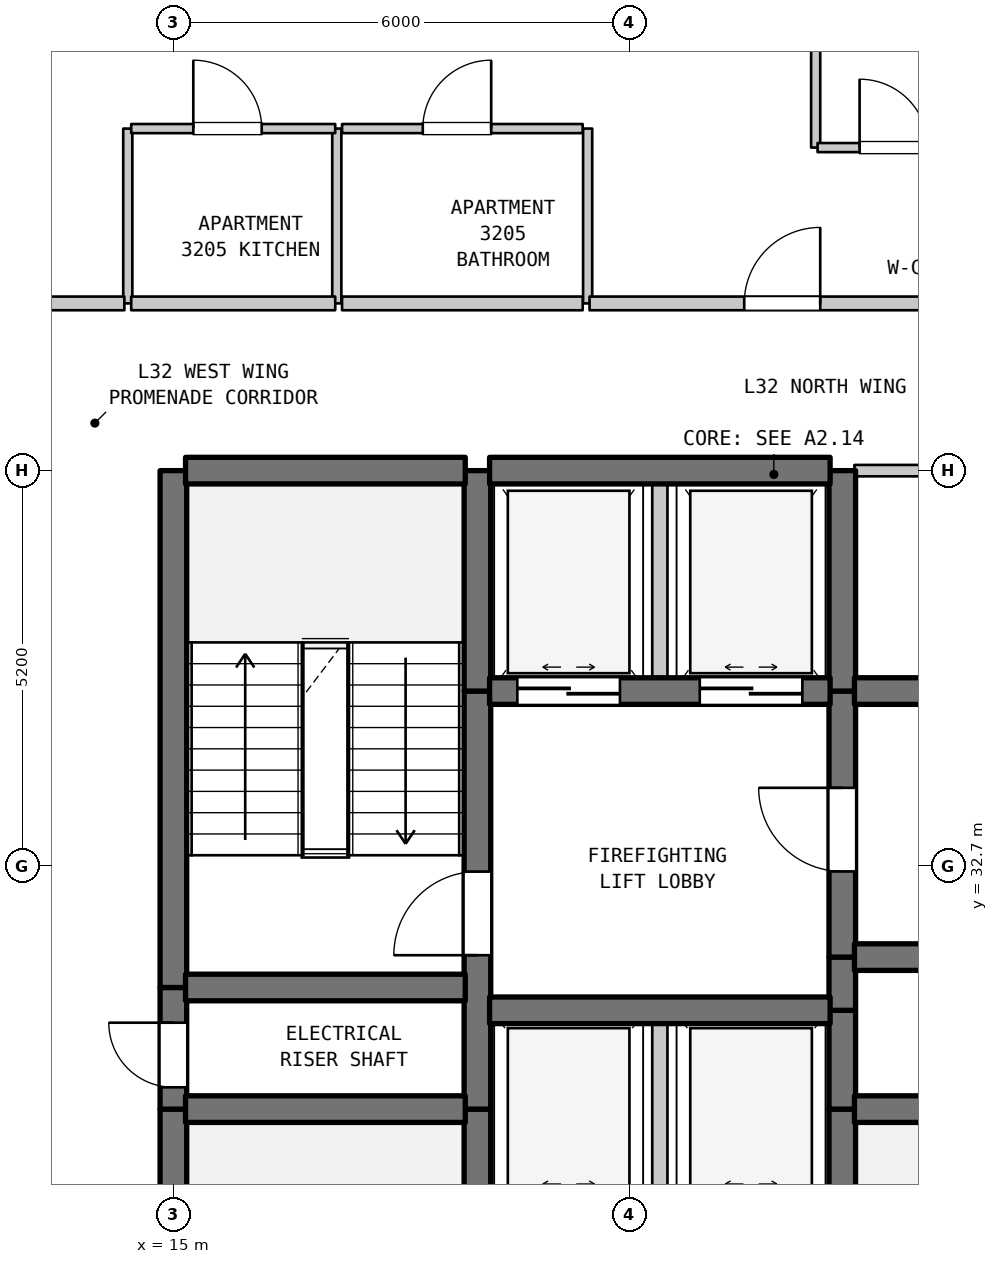
"""IFC4 building model, lengths in metres.
Left out: names, types, materials, properties, quantities, classifications, styles, units other than length and angle.
Written with IfcOpenShell. Run it as: python <this file> out.ifc"""

import sys

from ifc_helpers import new_model, si_unit, direction, frame, frame_2d, origin, place, context, subcontext, project, spatial, rectangle, extrude, element, fill, save


model = new_model("IFC4")
c1 = context("Model", 3, precision=1e-05, world=origin(), true_north=direction((0.0, 1.0)))
c2 = subcontext(c1, "Body", "Model", "MODEL_VIEW")
j1 = project(units=[si_unit("LENGTHUNIT", "METRE"), si_unit("PLANEANGLEUNIT", "RADIAN")], contexts=[c1])
p1 = place(None, origin())
s1 = spatial("IfcSite", under=j1, at=p1, CompositionType="ELEMENT")
p2 = place(p1, origin())
s2 = spatial("IfcBuilding", under=s1, at=p2, CompositionType="ELEMENT")
p3 = place(p2, frame((0.0, 0.0, 133.5)))
s3 = spatial("IfcBuildingStorey", under=s2, at=p3, CompositionType="ELEMENT", Elevation=133.5)
p4 = place(p3, frame((14.4, 40.1, 0.0), z_axis=(0.0, 0.0, 1.0), x_axis=(0.0, 1.0, 0.0)))
e1 = element("IfcWall", 1, at=p4, inside=s3, PredefinedType="PARTITIONING", context=c2, shape_type="SweptSolid", body=[
    extrude(rectangle(XDim=2.3, YDim=0.12, at=frame_2d((1.15, 0.0))), origin(), (0.0, 0.0, 1.0), 3.385),
])
p5 = place(p3, frame((15.0, 22.7, 0.0), z_axis=(0.0, 0.0, 1.0), x_axis=(0.0, 1.0, 0.0)))
e2 = element("IfcWall", 2, at=p5, inside=s3, PredefinedType="SHEAR", context=c2, shape_type="SweptSolid", body=[
    extrude(rectangle(XDim=6.8, YDim=0.35, at=frame_2d((3.4, 0.0))), origin(), (0.0, 0.0, 1.0), 3.385),
])
p6 = place(p3, frame((15.0, 29.5, 0.0), z_axis=(0.0, 0.0, 1.0), x_axis=(0.0, 1.0, 0.0)))
e3 = element("IfcWall", 3, at=p6, inside=s3, PredefinedType="SHEAR", context=c2, shape_type="SweptSolid", body=[
    extrude(rectangle(XDim=1.6, YDim=0.35, at=frame_2d((0.8, 0.0))), origin(), (0.0, 0.0, 1.0), 3.385),
])
p7 = place(p6, frame((0.287, 0.0, 0.0)))
e4 = element("IfcOpeningElement", 4, at=p7, cuts=e3, PredefinedType="OPENING", context=c2, shape_type="SweptSolid", body=[
    extrude(rectangle(XDim=0.85, YDim=2.1, at=frame_2d((0.425, 1.05))), frame((0.0, 0.185, 0.0), z_axis=(0.0, -1.0, 0.0), x_axis=(1.0, 0.0, 0.0)), (0.0, 0.0, 1.0), 0.37),
])
p8 = place(p3, frame((15.0, 31.1, 0.0), z_axis=(0.0, 0.0, 1.0), x_axis=(0.0, 1.0, 0.0)))
e5 = element("IfcWall", 5, at=p8, inside=s3, PredefinedType="SHEAR", context=c2, shape_type="SweptSolid", body=[
    extrude(rectangle(XDim=6.8, YDim=0.35, at=frame_2d((3.4, 0.0))), origin(), (0.0, 0.0, 1.0), 3.385),
])
p9 = place(p3, frame((17.15, 40.1, 0.0), z_axis=(0.0, 0.0, 1.0), x_axis=(0.0, 1.0, 0.0)))
e6 = element("IfcWall", 6, at=p9, inside=s3, PredefinedType="PARTITIONING", context=c2, shape_type="SweptSolid", body=[
    extrude(rectangle(XDim=2.3, YDim=0.12, at=frame_2d((1.15, 0.0))), origin(), (0.0, 0.0, 1.0), 3.385),
])
p10 = place(p3, frame((19.0, 28.2, 0.0), z_axis=(0.0, 0.0, 1.0), x_axis=(0.0, 1.0, 0.0)))
e7 = element("IfcWall", 7, at=p10, inside=s3, PredefinedType="SHEAR", context=c2, shape_type="SweptSolid", body=[
    extrude(rectangle(XDim=1.3, YDim=0.35, at=frame_2d((0.65, 0.0))), origin(), (0.0, 0.0, 1.0), 3.385),
])
p11 = place(p3, frame((19.0, 29.5, 0.0), z_axis=(0.0, 0.0, 1.0), x_axis=(0.0, 1.0, 0.0)))
e8 = element("IfcWall", 8, at=p11, inside=s3, PredefinedType="SHEAR", context=c2, shape_type="SweptSolid", body=[
    extrude(rectangle(XDim=5.5, YDim=0.35, at=frame_2d((2.75, 0.0))), origin(), (0.0, 0.0, 1.0), 3.385),
])
p12 = place(p11, frame((2.025, 0.0, 0.0)))
e9 = element("IfcOpeningElement", 9, at=p12, cuts=e8, PredefinedType="OPENING", context=c2, shape_type="SweptSolid", body=[
    extrude(rectangle(XDim=1.1, YDim=2.15, at=frame_2d((0.55, 1.075))), frame((0.0, 0.185, 0.0), z_axis=(0.0, -1.0, 0.0), x_axis=(1.0, 0.0, 0.0)), (0.0, 0.0, 1.0), 0.37),
])
p13 = place(p3, frame((19.0, 35.0, 0.0), z_axis=(0.0, 0.0, 1.0), x_axis=(0.0, 1.0, 0.0)))
e10 = element("IfcWall", 10, at=p13, inside=s3, PredefinedType="SHEAR", context=c2, shape_type="SweptSolid", body=[
    extrude(rectangle(XDim=2.9, YDim=0.35, at=frame_2d((1.45, 0.0))), origin(), (0.0, 0.0, 1.0), 3.385),
])
p14 = place(p3, frame((20.45, 40.1, 0.0), z_axis=(0.0, 0.0, 1.0), x_axis=(0.0, 1.0, 0.0)))
e11 = element("IfcWall", 11, at=p14, inside=s3, PredefinedType="PARTITIONING", context=c2, shape_type="SweptSolid", body=[
    extrude(rectangle(XDim=2.3, YDim=0.12, at=frame_2d((1.15, 0.0))), origin(), (0.0, 0.0, 1.0), 3.385),
])
p15 = place(p3, frame((21.4, 28.2, 0.0), z_axis=(0.0, 0.0, 1.0), x_axis=(0.0, 1.0, 0.0)))
e12 = element("IfcWall", 12, at=p15, inside=s3, PredefinedType="STANDARD", context=c2, shape_type="SweptSolid", body=[
    extrude(rectangle(XDim=2.6, YDim=0.2, at=frame_2d((1.3, 0.0))), origin(), (0.0, 0.0, 1.0), 3.385),
])
p16 = place(p3, frame((21.4, 35.0, 0.0), z_axis=(0.0, 0.0, 1.0), x_axis=(0.0, 1.0, 0.0)))
e13 = element("IfcWall", 13, at=p16, inside=s3, PredefinedType="STANDARD", context=c2, shape_type="SweptSolid", body=[
    extrude(rectangle(XDim=2.9, YDim=0.2, at=frame_2d((1.45, 0.0))), origin(), (0.0, 0.0, 1.0), 3.385),
])
p17 = place(p3, frame((23.45, 42.15, 0.0), z_axis=(0.0, 0.0, 1.0), x_axis=(0.0, 1.0, 0.0)))
e14 = element("IfcWall", 14, at=p17, inside=s3, PredefinedType="PARTITIONING", context=c2, shape_type="SweptSolid", body=[
    extrude(rectangle(XDim=11.74, YDim=0.12, at=frame_2d((5.87, 0.0))), origin(), (0.0, 0.0, 1.0), 3.385),
])
for number, where, z_axis, x_axis in (
    (15, (23.8, 28.2, 0.0), (0.0, 0.0, 1.0), (0.0, 1.0, 0.0)),
    (16, (23.8, 29.5, 0.0), (0.0, 0.0, 1.0), (0.0, 1.0, 0.0)),
):
    element("IfcWall", number, at=place(p3, frame(where, z_axis=z_axis, x_axis=x_axis)), inside=s3, PredefinedType="SHEAR", context=c2, shape_type="SweptSolid", body=[
        extrude(rectangle(XDim=1.3, YDim=0.35, at=frame_2d((0.65, 0.0))), origin(), (0.0, 0.0, 1.0), 3.385),
    ])
p18 = place(p3, frame((23.8, 30.8, 0.0), z_axis=(0.0, 0.0, 1.0), x_axis=(0.0, 1.0, 0.0)))
e17 = element("IfcWall", 17, at=p18, inside=s3, PredefinedType="SHEAR", context=c2, shape_type="SweptSolid", body=[
    extrude(rectangle(XDim=0.7, YDim=0.35, at=frame_2d((0.35, 0.0))), origin(), (0.0, 0.0, 1.0), 3.385),
])
p19 = place(p3, frame((23.8, 31.5, 0.0), z_axis=(0.0, 0.0, 1.0), x_axis=(0.0, 1.0, 0.0)))
e18 = element("IfcWall", 18, at=p19, inside=s3, PredefinedType="SHEAR", context=c2, shape_type="SweptSolid", body=[
    extrude(rectangle(XDim=3.5, YDim=0.35, at=frame_2d((1.75, 0.0))), origin(), (0.0, 0.0, 1.0), 3.385),
])
p20 = place(p19, frame((1.127, 0.0, 0.0)))
e19 = element("IfcOpeningElement", 19, at=p20, cuts=e18, PredefinedType="OPENING", context=c2, shape_type="SweptSolid", body=[
    extrude(rectangle(XDim=1.1, YDim=2.15, at=frame_2d((0.55, 1.075))), frame((0.0, 0.185, 0.0), z_axis=(0.0, -1.0, 0.0), x_axis=(1.0, 0.0, 0.0)), (0.0, 0.0, 1.0), 0.37),
])
p21 = place(p3, frame((23.8, 35.0, 0.0), z_axis=(0.0, 0.0, 1.0), x_axis=(0.0, 1.0, 0.0)))
e20 = element("IfcWall", 20, at=p21, inside=s3, PredefinedType="SHEAR", context=c2, shape_type="SweptSolid", body=[
    extrude(rectangle(XDim=2.9, YDim=0.35, at=frame_2d((1.45, 0.0))), origin(), (0.0, 0.0, 1.0), 3.385),
])
p22 = place(p3, frame((15.16, 29.5, 0.0), z_axis=(0.0, 0.0, 1.0), x_axis=(1.0, 0.0, 0.0)))
e21 = element("IfcWall", 21, at=p22, inside=s3, PredefinedType="SHEAR", context=c2, shape_type="SweptSolid", body=[
    extrude(rectangle(XDim=3.68, YDim=0.35, at=frame_2d((1.84, 0.0))), origin(), (0.0, 0.0, 1.0), 3.385),
])
p23 = place(p3, frame((23.96, 29.5, 0.0), z_axis=(0.0, 0.0, 1.0), x_axis=(1.0, 0.0, 0.0)))
e22 = element("IfcWall", 22, at=p23, inside=s3, PredefinedType="SHEAR", context=c2, shape_type="SweptSolid", body=[
    extrude(rectangle(XDim=3.18, YDim=0.35, at=frame_2d((1.59, 0.0))), origin(), (0.0, 0.0, 1.0), 3.385),
])
p24 = place(p3, frame((19.16, 30.8, 0.0), z_axis=(0.0, 0.0, 1.0), x_axis=(1.0, 0.0, 0.0)))
e23 = element("IfcWall", 23, at=p24, inside=s3, PredefinedType="SHEAR", context=c2, shape_type="SweptSolid", body=[
    extrude(rectangle(XDim=4.48, YDim=0.35, at=frame_2d((2.24, 0.0))), origin(), (0.0, 0.0, 1.0), 3.385),
])
p25 = place(p3, frame((15.16, 31.1, 0.0), z_axis=(0.0, 0.0, 1.0), x_axis=(1.0, 0.0, 0.0)))
e24 = element("IfcWall", 24, at=p25, inside=s3, PredefinedType="SHEAR", context=c2, shape_type="SweptSolid", body=[
    extrude(rectangle(XDim=3.68, YDim=0.35, at=frame_2d((1.84, 0.0))), origin(), (0.0, 0.0, 1.0), 3.385),
])
p26 = place(p3, frame((23.96, 31.5, 0.0), z_axis=(0.0, 0.0, 1.0), x_axis=(1.0, 0.0, 0.0)))
e25 = element("IfcWall", 25, at=p26, inside=s3, PredefinedType="SHEAR", context=c2, shape_type="SweptSolid", body=[
    extrude(rectangle(XDim=3.18, YDim=0.35, at=frame_2d((1.59, 0.0))), origin(), (0.0, 0.0, 1.0), 3.385),
])
p27 = place(p26, frame((1.094, 0.0, 0.0)))
e26 = element("IfcOpeningElement", 26, at=p27, cuts=e25, PredefinedType="OPENING", context=c2, shape_type="SweptSolid", body=[
    extrude(rectangle(XDim=0.85, YDim=2.1, at=frame_2d((0.425, 1.05))), frame((0.0, 0.185, 0.0), z_axis=(0.0, -1.0, 0.0), x_axis=(1.0, 0.0, 0.0)), (0.0, 0.0, 1.0), 0.37),
])
p28 = place(p3, frame((19.16, 35.0, 0.0), z_axis=(0.0, 0.0, 1.0), x_axis=(1.0, 0.0, 0.0)))
e27 = element("IfcWall", 27, at=p28, inside=s3, PredefinedType="SHEAR", context=c2, shape_type="SweptSolid", body=[
    extrude(rectangle(XDim=4.48, YDim=0.35, at=frame_2d((2.24, 0.0))), origin(), (0.0, 0.0, 1.0), 3.385),
])
p29 = place(p28, frame((0.365, 0.0, 0.0)))
e28 = element("IfcOpeningElement", 28, at=p29, cuts=e27, PredefinedType="OPENING", context=c2, shape_type="SweptSolid", body=[
    extrude(rectangle(XDim=1.35, YDim=2.2, at=frame_2d((0.675, 1.1))), frame((0.0, 0.185, 0.0), z_axis=(0.0, -1.0, 0.0), x_axis=(1.0, 0.0, 0.0)), (0.0, 0.0, 1.0), 0.37),
])
p30 = place(p28, frame((2.765, 0.0, 0.0)))
e29 = element("IfcOpeningElement", 29, at=p30, cuts=e27, PredefinedType="OPENING", context=c2, shape_type="SweptSolid", body=[
    extrude(rectangle(XDim=1.35, YDim=2.2, at=frame_2d((0.675, 1.1))), frame((0.0, 0.185, 0.0), z_axis=(0.0, -1.0, 0.0), x_axis=(1.0, 0.0, 0.0)), (0.0, 0.0, 1.0), 0.37),
])
p31 = place(p3, frame((23.96, 35.0, 0.0), z_axis=(0.0, 0.0, 1.0), x_axis=(1.0, 0.0, 0.0)))
e30 = element("IfcWall", 30, at=p31, inside=s3, PredefinedType="SHEAR", context=c2, shape_type="SweptSolid", body=[
    extrude(rectangle(XDim=3.995, YDim=0.35, at=frame_2d((1.998, 0.0))), origin(), (0.0, 0.0, 1.0), 3.385),
])
p32 = place(p31, frame((1.393, 0.0, 0.0)))
e31 = element("IfcOpeningElement", 31, at=p32, cuts=e30, PredefinedType="OPENING", context=c2, shape_type="SweptSolid", body=[
    extrude(rectangle(XDim=0.95, YDim=2.15, at=frame_2d((0.475, 1.075))), frame((0.0, 0.185, 0.0), z_axis=(0.0, -1.0, 0.0), x_axis=(1.0, 0.0, 0.0)), (0.0, 0.0, 1.0), 0.37),
])
p33 = place(p3, frame((15.16, 37.9, 0.0), z_axis=(0.0, 0.0, 1.0), x_axis=(1.0, 0.0, 0.0)))
e32 = element("IfcWall", 32, at=p33, inside=s3, PredefinedType="SHEAR", context=c2, shape_type="SweptSolid", body=[
    extrude(rectangle(XDim=3.68, YDim=0.35, at=frame_2d((1.84, 0.0))), origin(), (0.0, 0.0, 1.0), 3.385),
])
p34 = place(p3, frame((19.16, 37.9, 0.0), z_axis=(0.0, 0.0, 1.0), x_axis=(1.0, 0.0, 0.0)))
e33 = element("IfcWall", 33, at=p34, inside=s3, PredefinedType="SHEAR", context=c2, shape_type="SweptSolid", body=[
    extrude(rectangle(XDim=4.48, YDim=0.35, at=frame_2d((2.24, 0.0))), origin(), (0.0, 0.0, 1.0), 3.385),
])
p35 = place(p3, frame((23.96, 37.9, 0.0), z_axis=(0.0, 0.0, 1.0), x_axis=(1.0, 0.0, 0.0)))
e34 = element("IfcWall", 34, at=p35, inside=s3, PredefinedType="STANDARD", context=c2, shape_type="SweptSolid", body=[
    extrude(rectangle(XDim=3.995, YDim=0.15, at=frame_2d((1.998, 0.0))), origin(), (0.0, 0.0, 1.0), 2.885),
])
p36 = place(p3, frame((12.875, 40.1, 0.0), z_axis=(0.0, 0.0, 1.0), x_axis=(1.0, 0.0, 0.0)))
e35 = element("IfcWall", 35, at=p36, inside=s3, PredefinedType="STANDARD", context=c2, shape_type="SweptSolid", body=[
    extrude(rectangle(XDim=1.48, YDim=0.18, at=frame_2d((0.74, 0.0))), origin(), (0.0, 0.0, 1.0), 3.385),
])
p37 = place(p3, frame((14.445, 40.1, 0.0), z_axis=(0.0, 0.0, 1.0), x_axis=(1.0, 0.0, 0.0)))
e36 = element("IfcWall", 36, at=p37, inside=s3, PredefinedType="STANDARD", context=c2, shape_type="SweptSolid", body=[
    extrude(rectangle(XDim=2.684, YDim=0.18, at=frame_2d((1.342, 0.0))), origin(), (0.0, 0.0, 1.0), 3.385),
])
p38 = place(p3, frame((17.219, 40.1, 0.0), z_axis=(0.0, 0.0, 1.0), x_axis=(1.0, 0.0, 0.0)))
e37 = element("IfcWall", 37, at=p38, inside=s3, PredefinedType="STANDARD", context=c2, shape_type="SweptSolid", body=[
    extrude(rectangle(XDim=3.166, YDim=0.18, at=frame_2d((1.583, 0.0))), origin(), (0.0, 0.0, 1.0), 3.385),
])
p39 = place(p3, frame((20.475, 40.1, 0.0), z_axis=(0.0, 0.0, 1.0), x_axis=(1.0, 0.0, 0.0)))
e38 = element("IfcWall", 38, at=p39, inside=s3, PredefinedType="STANDARD", context=c2, shape_type="SweptSolid", body=[
    extrude(rectangle(XDim=8.76, YDim=0.18, at=frame_2d((4.38, 0.0))), origin(), (0.0, 0.0, 1.0), 3.385),
])
p40 = place(p39, frame((2.035, 0.0, 0.0)))
e39 = element("IfcOpeningElement", 39, at=p40, cuts=e38, PredefinedType="OPENING", context=c2, shape_type="SweptSolid", body=[
    extrude(rectangle(XDim=1.0, YDim=2.15, at=frame_2d((0.5, 1.075))), frame((0.0, 0.1, 0.0), z_axis=(0.0, -1.0, 0.0), x_axis=(1.0, 0.0, 0.0)), (0.0, 0.0, 1.0), 0.2),
])
p41 = place(p39, frame((6.409, 0.0, 0.0)))
e40 = element("IfcOpeningElement", 40, at=p41, cuts=e38, PredefinedType="OPENING", context=c2, shape_type="SweptSolid", body=[
    extrude(rectangle(XDim=1.0, YDim=2.15, at=frame_2d((0.5, 1.075))), frame((0.0, 0.1, 0.0), z_axis=(0.0, -1.0, 0.0), x_axis=(1.0, 0.0, 0.0)), (0.0, 0.0, 1.0), 0.2),
])
p42 = place(p3, frame((23.475, 42.15, 0.0), z_axis=(0.0, 0.0, 1.0), x_axis=(1.0, 0.0, 0.0)))
e41 = element("IfcWall", 41, at=p42, inside=s3, PredefinedType="PARTITIONING", context=c2, shape_type="SweptSolid", body=[
    extrude(rectangle(XDim=2.16, YDim=0.12, at=frame_2d((1.08, 0.0))), origin(), (0.0, 0.0, 1.0), 3.385),
])
p43 = place(p42, frame((0.553, 0.0, 0.0)))
e42 = element("IfcOpeningElement", 42, at=p43, cuts=e41, PredefinedType="OPENING", context=c2, shape_type="SweptSolid", body=[
    extrude(rectangle(XDim=0.9, YDim=2.15, at=frame_2d((0.45, 1.075))), frame((0.0, 0.07, 0.0), z_axis=(0.0, -1.0, 0.0), x_axis=(1.0, 0.0, 0.0)), (0.0, 0.0, 1.0), 0.14),
])
p44 = place(p3, frame((14.445, 42.4, 0.0), z_axis=(0.0, 0.0, 1.0), x_axis=(1.0, 0.0, 0.0)))
e43 = element("IfcWall", 43, at=p44, inside=s3, PredefinedType="PARTITIONING", context=c2, shape_type="SweptSolid", body=[
    extrude(rectangle(XDim=2.684, YDim=0.12, at=frame_2d((1.342, 0.0))), origin(), (0.0, 0.0, 1.0), 3.385),
])
p45 = place(p44, frame((0.817, 0.0, 0.0)))
e44 = element("IfcOpeningElement", 44, at=p45, cuts=e43, PredefinedType="OPENING", context=c2, shape_type="SweptSolid", body=[
    extrude(rectangle(XDim=0.9, YDim=2.15, at=frame_2d((0.45, 1.075))), frame((0.0, 0.07, 0.0), z_axis=(0.0, -1.0, 0.0), x_axis=(1.0, 0.0, 0.0)), (0.0, 0.0, 1.0), 0.14),
])
p46 = place(p3, frame((17.219, 42.4, 0.0), z_axis=(0.0, 0.0, 1.0), x_axis=(1.0, 0.0, 0.0)))
e45 = element("IfcWall", 45, at=p46, inside=s3, PredefinedType="PARTITIONING", context=c2, shape_type="SweptSolid", body=[
    extrude(rectangle(XDim=3.166, YDim=0.12, at=frame_2d((1.583, 0.0))), origin(), (0.0, 0.0, 1.0), 3.385),
])
p47 = place(p46, frame((1.062, 0.0, 0.0)))
e46 = element("IfcOpeningElement", 46, at=p47, cuts=e45, PredefinedType="OPENING", context=c2, shape_type="SweptSolid", body=[
    extrude(rectangle(XDim=0.9, YDim=2.1, at=frame_2d((0.45, 1.05))), frame((0.0, 0.07, 0.0), z_axis=(0.0, -1.0, 0.0), x_axis=(1.0, 0.0, 0.0)), (0.0, 0.0, 1.0), 0.14),
])
p48 = place(p7, origin())
e47 = element("IfcDoor", 47, at=p48, inside=s3, OperationType="SINGLE_SWING_RIGHT", PredefinedType="DOOR", context=c2, shape_type="SweptSolid", body=[
    extrude(rectangle(XDim=0.85, YDim=2.1, at=frame_2d((0.425, 1.05))), frame((0.0, 0.025, 0.0), z_axis=(0.0, -1.0, 0.0), x_axis=(1.0, 0.0, 0.0)), (0.0, 0.0, 1.0), 0.05),
])
fill(e4, e47)
p49 = place(p12, origin())
e48 = element("IfcDoor", 48, at=p49, inside=s3, OperationType="SINGLE_SWING_LEFT", PredefinedType="DOOR", context=c2, shape_type="SweptSolid", body=[
    extrude(rectangle(XDim=1.1, YDim=2.15, at=frame_2d((0.55, 1.075))), frame((0.0, 0.025, 0.0), z_axis=(0.0, -1.0, 0.0), x_axis=(1.0, 0.0, 0.0)), (0.0, 0.0, 1.0), 0.05),
])
fill(e9, e48)
p50 = place(p20, origin())
e49 = element("IfcDoor", 49, at=p50, inside=s3, OperationType="SINGLE_SWING_RIGHT", PredefinedType="DOOR", context=c2, shape_type="SweptSolid", body=[
    extrude(rectangle(XDim=1.1, YDim=2.15, at=frame_2d((0.55, 1.075))), frame((0.0, 0.025, 0.0), z_axis=(0.0, -1.0, 0.0), x_axis=(1.0, 0.0, 0.0)), (0.0, 0.0, 1.0), 0.05),
])
fill(e19, e49)
p51 = place(p29, origin())
e50 = element("IfcDoor", 50, at=p51, inside=s3, OperationType="DOUBLE_DOOR_SLIDING", PredefinedType="DOOR", context=c2, shape_type="SweptSolid", body=[
    extrude(rectangle(XDim=1.35, YDim=2.2, at=frame_2d((0.675, 1.1))), frame((0.0, 0.025, 0.0), z_axis=(0.0, -1.0, 0.0), x_axis=(1.0, 0.0, 0.0)), (0.0, 0.0, 1.0), 0.05),
])
fill(e28, e50)
p52 = place(p30, origin())
e51 = element("IfcDoor", 51, at=p52, inside=s3, OperationType="DOUBLE_DOOR_SLIDING", PredefinedType="DOOR", context=c2, shape_type="SweptSolid", body=[
    extrude(rectangle(XDim=1.35, YDim=2.2, at=frame_2d((0.675, 1.1))), frame((0.0, 0.025, 0.0), z_axis=(0.0, -1.0, 0.0), x_axis=(1.0, 0.0, 0.0)), (0.0, 0.0, 1.0), 0.05),
])
fill(e29, e51)
p53 = place(p40, origin())
e52 = element("IfcDoor", 52, at=p53, inside=s3, OperationType="SINGLE_SWING_RIGHT", PredefinedType="DOOR", context=c2, shape_type="SweptSolid", body=[
    extrude(rectangle(XDim=1.0, YDim=2.15, at=frame_2d((0.5, 1.075))), frame((0.0, 0.025, 0.0), z_axis=(0.0, -1.0, 0.0), x_axis=(1.0, 0.0, 0.0)), (0.0, 0.0, 1.0), 0.05),
])
fill(e39, e52)
p54 = place(p43, origin())
e53 = element("IfcDoor", 53, at=p54, inside=s3, OperationType="SINGLE_SWING_LEFT", PredefinedType="DOOR", context=c2, shape_type="SweptSolid", body=[
    extrude(rectangle(XDim=0.9, YDim=2.15, at=frame_2d((0.45, 1.075))), frame((0.0, 0.025, 0.0), z_axis=(0.0, -1.0, 0.0), x_axis=(1.0, 0.0, 0.0)), (0.0, 0.0, 1.0), 0.05),
])
fill(e42, e53)
p55 = place(p45, origin())
e54 = element("IfcDoor", 54, at=p55, inside=s3, OperationType="SINGLE_SWING_LEFT", PredefinedType="DOOR", context=c2, shape_type="SweptSolid", body=[
    extrude(rectangle(XDim=0.9, YDim=2.15, at=frame_2d((0.45, 1.075))), frame((0.0, 0.025, 0.0), z_axis=(0.0, -1.0, 0.0), x_axis=(1.0, 0.0, 0.0)), (0.0, 0.0, 1.0), 0.05),
])
fill(e44, e54)
p56 = place(p47, origin())
e55 = element("IfcDoor", 55, at=p56, inside=s3, OperationType="SINGLE_SWING_RIGHT", PredefinedType="DOOR", context=c2, shape_type="SweptSolid", body=[
    extrude(rectangle(XDim=0.9, YDim=2.1, at=frame_2d((0.45, 1.05))), frame((0.0, 0.025, 0.0), z_axis=(0.0, -1.0, 0.0), x_axis=(1.0, 0.0, 0.0)), (0.0, 0.0, 1.0), 0.05),
])
fill(e46, e55)
save(model, sys.argv[1])
